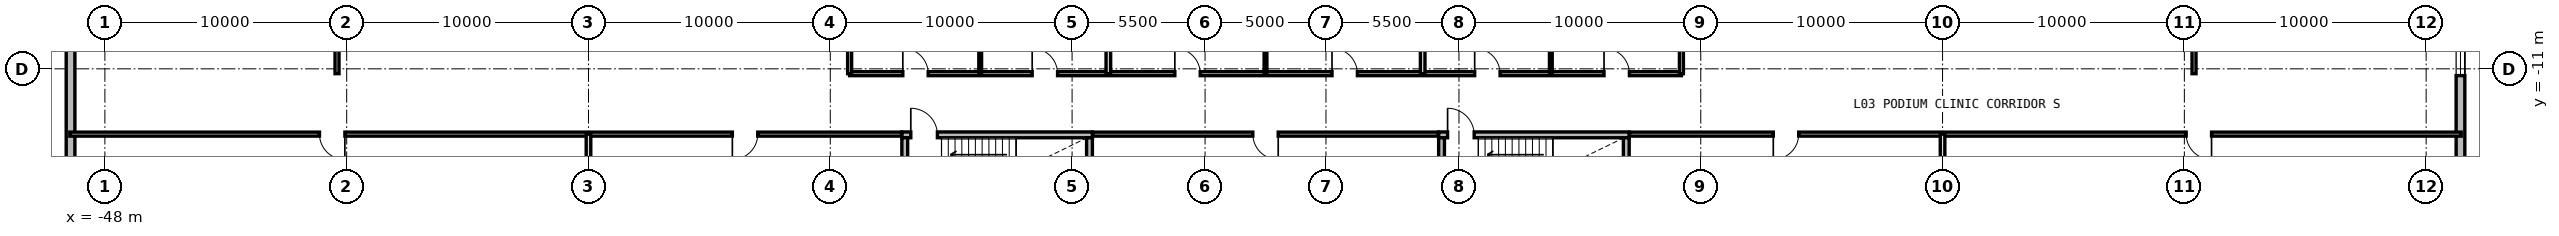
"""IFC4 building model, lengths in metres.
Left out: names, types, materials, properties, quantities, classifications, styles, units other than length and angle.
Written with IfcOpenShell. Run it as: python <this file> out.ifc"""

import sys

from ifc_helpers import new_model, si_unit, direction, frame, frame_2d, origin, place, context, subcontext, project, spatial, rectangle, extrude, source, transform, mapped, element, fill, save


model = new_model("IFC4")
c1 = context("Model", 3, precision=1e-05, world=origin(), true_north=direction((0.0, 1.0)))
c2 = subcontext(c1, "Body", "Model", "MODEL_VIEW")
j1 = project(units=[si_unit("LENGTHUNIT", "METRE"), si_unit("PLANEANGLEUNIT", "RADIAN")], contexts=[c1])
p1 = place(None, origin())
s1 = spatial("IfcSite", under=j1, at=p1, CompositionType="ELEMENT")
p2 = place(p1, origin())
s2 = spatial("IfcBuilding", under=s1, at=p2, CompositionType="ELEMENT")
p3 = place(p2, frame((0.0, 0.0, 12.6)))
s3 = spatial("IfcBuildingStorey", under=s2, at=p3, CompositionType="ELEMENT", Elevation=12.6)
m1 = source(origin(), c2, "Body", "SweptSolid", [
    extrude(rectangle(XDim=40.64, YDim=0.36, at=frame_2d((20.32, 0.0))), origin(), (0.0, 0.0, 1.0), 3.88),
])
p4 = place(p3, frame((-49.42, -20.32, 0.0), z_axis=(0.0, 0.0, 1.0), x_axis=(0.0, 1.0, 0.0)))
e1 = element("IfcWall", 1, at=p4, inside=s3, PredefinedType="SOLIDWALL", context=c2, shape_type="MappedRepresentation", body=[
    mapped(m1, transform((0.0, 0.0, 0.0), x_axis=(1.0, 0.0, 0.0), y_axis=(0.0, 1.0, 0.0), z_axis=(0.0, 0.0, 1.0), scale=1.0)),
])
p5 = place(p4, frame((12.4, 0.0, 0.85)))
e2 = element("IfcOpeningElement", 2, at=p5, cuts=e1, PredefinedType="OPENING", context=c2, shape_type="SweptSolid", body=[
    extrude(rectangle(XDim=3.0, YDim=2.1, at=frame_2d((1.5, 1.05))), frame((0.0, 0.19, 0.0), z_axis=(0.0, -1.0, 0.0), x_axis=(1.0, 0.0, 0.0)), (0.0, 0.0, 1.0), 0.38),
])
p6 = place(p3, frame((49.42, 20.32, 0.0), z_axis=(0.0, 0.0, 1.0), x_axis=(0.0, -1.0, 0.0)))
e3 = element("IfcWall", 3, at=p6, inside=s3, PredefinedType="SOLIDWALL", context=c2, shape_type="MappedRepresentation", body=[
    mapped(m1, transform((0.0, 0.0, 0.0), x_axis=(1.0, 0.0, 0.0), y_axis=(0.0, 1.0, 0.0), z_axis=(0.0, 0.0, 1.0), scale=1.0)),
])
p7 = place(p6, frame((4.0, 0.0, 0.85)))
e4 = element("IfcOpeningElement", 4, at=p7, cuts=e3, PredefinedType="OPENING", context=c2, shape_type="SweptSolid", body=[
    extrude(rectangle(XDim=2.4, YDim=2.2, at=frame_2d((1.2, 1.1))), frame((0.0, 0.19, 0.0), z_axis=(0.0, -1.0, 0.0), x_axis=(1.0, 0.0, 0.0)), (0.0, 0.0, 1.0), 0.38),
])
p8 = place(p6, frame((12.4, 0.0, 0.85)))
e5 = element("IfcOpeningElement", 5, at=p8, cuts=e3, PredefinedType="OPENING", context=c2, shape_type="SweptSolid", body=[
    extrude(rectangle(XDim=3.0, YDim=2.1, at=frame_2d((1.5, 1.05))), frame((0.0, 0.19, 0.0), z_axis=(0.0, -1.0, 0.0), x_axis=(1.0, 0.0, 0.0)), (0.0, 0.0, 1.0), 0.38),
])
p9 = place(p6, frame((29.2, 0.0, 0.85)))
e6 = element("IfcOpeningElement", 6, at=p9, cuts=e3, PredefinedType="OPENING", context=c2, shape_type="SweptSolid", body=[
    extrude(rectangle(XDim=2.4, YDim=2.2, at=frame_2d((1.2, 1.1))), frame((0.0, 0.19, 0.0), z_axis=(0.0, -1.0, 0.0), x_axis=(1.0, 0.0, 0.0)), (0.0, 0.0, 1.0), 0.38),
])
m2 = source(origin(), c2, "Body", "SweptSolid", [
    extrude(rectangle(XDim=7.88, YDim=0.24, at=frame_2d((3.94, 0.0))), origin(), (0.0, 0.0, 1.0), 3.88),
])
p10 = place(p3, frame((-15.04, -13.73, 0.0), z_axis=(0.0, 0.0, 1.0), x_axis=(1.0, 0.0, 0.0)))
e7 = element("IfcWall", 7, at=p10, inside=s3, PredefinedType="PARTITIONING", context=c2, shape_type="MappedRepresentation", body=[
    mapped(m2, transform((0.0, 0.0, 0.0), x_axis=(1.0, 0.0, 0.0), y_axis=(0.0, 1.0, 0.0), z_axis=(0.0, 0.0, 1.0), scale=1.0)),
])
p11 = place(p10, frame((0.37, 0.0, 0.0)))
e8 = element("IfcOpeningElement", 8, at=p11, cuts=e7, PredefinedType="OPENING", context=c2, shape_type="SweptSolid", body=[
    extrude(rectangle(XDim=1.1, YDim=2.15, at=frame_2d((0.55, 1.075))), frame((0.0, 0.13, 0.0), z_axis=(0.0, -1.0, 0.0), x_axis=(1.0, 0.0, 0.0)), (0.0, 0.0, 1.0), 0.26),
])
m3 = source(origin(), c2, "Body", "SweptSolid", [
    extrude(rectangle(XDim=2.95, YDim=0.24, at=frame_2d((1.475, 0.0))), origin(), (0.0, 0.0, 1.0), 3.88),
])
for number, where, z_axis, x_axis in (
    (9, (-14.92, -16.8, 0.0), (0.0, 0.0, 1.0), (0.0, 1.0, 0.0)),
    (10, (-7.28, -16.8, 0.0), (0.0, 0.0, 1.0), (0.0, 1.0, 0.0)),
):
    element("IfcWall", number, at=place(p3, frame(where, z_axis=z_axis, x_axis=x_axis)), inside=s3, PredefinedType="PARTITIONING", context=c2, shape_type="MappedRepresentation", body=[
        mapped(m3, transform((0.0, 0.0, 0.0), x_axis=(1.0, 0.0, 0.0), y_axis=(0.0, 1.0, 0.0), z_axis=(0.0, 0.0, 1.0), scale=1.0)),
    ])
p12 = place(p3, frame((7.16, -13.73, 0.0), z_axis=(0.0, 0.0, 1.0), x_axis=(1.0, 0.0, 0.0)))
e11 = element("IfcWall", 11, at=p12, inside=s3, PredefinedType="PARTITIONING", context=c2, shape_type="MappedRepresentation", body=[
    mapped(m2, transform((0.0, 0.0, 0.0), x_axis=(1.0, 0.0, 0.0), y_axis=(0.0, 1.0, 0.0), z_axis=(0.0, 0.0, 1.0), scale=1.0)),
])
p13 = place(p12, frame((0.37, 0.0, 0.0)))
e12 = element("IfcOpeningElement", 12, at=p13, cuts=e11, PredefinedType="OPENING", context=c2, shape_type="SweptSolid", body=[
    extrude(rectangle(XDim=1.1, YDim=2.15, at=frame_2d((0.55, 1.075))), frame((0.0, 0.13, 0.0), z_axis=(0.0, -1.0, 0.0), x_axis=(1.0, 0.0, 0.0)), (0.0, 0.0, 1.0), 0.26),
])
for number, where, z_axis, x_axis in (
    (13, (7.28, -16.8, 0.0), (0.0, 0.0, 1.0), (0.0, 1.0, 0.0)),
    (14, (14.92, -16.8, 0.0), (0.0, 0.0, 1.0), (0.0, 1.0, 0.0)),
):
    element("IfcWall", number, at=place(p3, frame(where, z_axis=z_axis, x_axis=x_axis)), inside=s3, PredefinedType="PARTITIONING", context=c2, shape_type="MappedRepresentation", body=[
        mapped(m3, transform((0.0, 0.0, 0.0), x_axis=(1.0, 0.0, 0.0), y_axis=(0.0, 1.0, 0.0), z_axis=(0.0, 0.0, 1.0), scale=1.0)),
    ])
m4 = source(origin(), c2, "Body", "SweptSolid", [
    extrude(rectangle(XDim=17.6, YDim=0.165, at=frame_2d((8.8, 0.0))), origin(), (0.0, 0.0, 1.0), 3.865),
])
p14 = place(p3, frame((-38.4, -11.2, 0.0), z_axis=(0.0, 0.0, 1.0), x_axis=(0.0, 1.0, 0.0)))
e15 = element("IfcWall", 15, at=p14, inside=s3, PredefinedType="PARTITIONING", context=c2, shape_type="MappedRepresentation", body=[
    mapped(m4, transform((0.0, 0.0, 0.0), x_axis=(1.0, 0.0, 0.0), y_axis=(0.0, 1.0, 0.0), z_axis=(0.0, 0.0, 1.0), scale=1.0)),
])
p15 = place(p14, frame((4.2, 0.0, 0.0)))
e16 = element("IfcOpeningElement", 16, at=p15, cuts=e15, PredefinedType="OPENING", context=c2, shape_type="SweptSolid", body=[
    extrude(rectangle(XDim=1.25, YDim=2.2, at=frame_2d((0.625, 1.1))), frame((0.0, 0.093, 0.0), z_axis=(0.0, -1.0, 0.0), x_axis=(1.0, 0.0, 0.0)), (0.0, 0.0, 1.0), 0.185),
])
p16 = place(p14, frame((13.5, 0.0, 0.0)))
e17 = element("IfcOpeningElement", 17, at=p16, cuts=e15, PredefinedType="OPENING", context=c2, shape_type="SweptSolid", body=[
    extrude(rectangle(XDim=1.25, YDim=2.2, at=frame_2d((0.625, 1.1))), frame((0.0, 0.093, 0.0), z_axis=(0.0, -1.0, 0.0), x_axis=(1.0, 0.0, 0.0)), (0.0, 0.0, 1.0), 0.185),
])
p17 = place(p3, frame((38.4, -11.2, 0.0), z_axis=(0.0, 0.0, 1.0), x_axis=(0.0, 1.0, 0.0)))
e18 = element("IfcWall", 18, at=p17, inside=s3, PredefinedType="PARTITIONING", context=c2, shape_type="MappedRepresentation", body=[
    mapped(m4, transform((0.0, 0.0, 0.0), x_axis=(1.0, 0.0, 0.0), y_axis=(0.0, 1.0, 0.0), z_axis=(0.0, 0.0, 1.0), scale=1.0)),
])
p18 = place(p17, frame((4.2, 0.0, 0.0)))
e19 = element("IfcOpeningElement", 19, at=p18, cuts=e18, PredefinedType="OPENING", context=c2, shape_type="SweptSolid", body=[
    extrude(rectangle(XDim=1.25, YDim=2.2, at=frame_2d((0.625, 1.1))), frame((0.0, 0.093, 0.0), z_axis=(0.0, -1.0, 0.0), x_axis=(1.0, 0.0, 0.0)), (0.0, 0.0, 1.0), 0.185),
])
p19 = place(p17, frame((13.5, 0.0, 0.0)))
e20 = element("IfcOpeningElement", 20, at=p19, cuts=e18, PredefinedType="OPENING", context=c2, shape_type="SweptSolid", body=[
    extrude(rectangle(XDim=1.25, YDim=2.2, at=frame_2d((0.625, 1.1))), frame((0.0, 0.093, 0.0), z_axis=(0.0, -1.0, 0.0), x_axis=(1.0, 0.0, 0.0)), (0.0, 0.0, 1.0), 0.185),
])
m5 = source(origin(), c2, "Body", "SweptSolid", [
    extrude(rectangle(XDim=34.4, YDim=0.165, at=frame_2d((17.2, 0.0))), origin(), (0.0, 0.0, 1.0), 3.865),
])
p20 = place(p3, frame((-17.2, -11.2, 0.0), z_axis=(0.0, 0.0, 1.0), x_axis=(1.0, 0.0, 0.0)))
e21 = element("IfcWall", 21, at=p20, inside=s3, PredefinedType="PARTITIONING", context=c2, shape_type="MappedRepresentation", body=[
    mapped(m5, transform((0.0, 0.0, 0.0), x_axis=(1.0, 0.0, 0.0), y_axis=(0.0, 1.0, 0.0), z_axis=(0.0, 0.0, 1.0), scale=1.0)),
])
p21 = place(p20, frame((2.2, 0.0, 0.0)))
e22 = element("IfcOpeningElement", 22, at=p21, cuts=e21, PredefinedType="OPENING", context=c2, shape_type="SweptSolid", body=[
    extrude(rectangle(XDim=1.05, YDim=2.15, at=frame_2d((0.525, 1.075))), frame((0.0, 0.093, 0.0), z_axis=(0.0, -1.0, 0.0), x_axis=(1.0, 0.0, 0.0)), (0.0, 0.0, 1.0), 0.185),
])
p22 = place(p20, frame((7.55, 0.0, 0.0)))
e23 = element("IfcOpeningElement", 23, at=p22, cuts=e21, PredefinedType="OPENING", context=c2, shape_type="SweptSolid", body=[
    extrude(rectangle(XDim=1.05, YDim=2.15, at=frame_2d((0.525, 1.075))), frame((0.0, 0.093, 0.0), z_axis=(0.0, -1.0, 0.0), x_axis=(1.0, 0.0, 0.0)), (0.0, 0.0, 1.0), 0.185),
])
p23 = place(p20, frame((13.45, 0.0, 0.0)))
e24 = element("IfcOpeningElement", 24, at=p23, cuts=e21, PredefinedType="OPENING", context=c2, shape_type="SweptSolid", body=[
    extrude(rectangle(XDim=1.05, YDim=2.15, at=frame_2d((0.525, 1.075))), frame((0.0, 0.093, 0.0), z_axis=(0.0, -1.0, 0.0), x_axis=(1.0, 0.0, 0.0)), (0.0, 0.0, 1.0), 0.185),
])
p24 = place(p20, frame((19.95, 0.0, 0.0)))
e25 = element("IfcOpeningElement", 25, at=p24, cuts=e21, PredefinedType="OPENING", context=c2, shape_type="SweptSolid", body=[
    extrude(rectangle(XDim=1.05, YDim=2.15, at=frame_2d((0.525, 1.075))), frame((0.0, 0.093, 0.0), z_axis=(0.0, -1.0, 0.0), x_axis=(1.0, 0.0, 0.0)), (0.0, 0.0, 1.0), 0.185),
])
p25 = place(p20, frame((25.85, 0.0, 0.0)))
e26 = element("IfcOpeningElement", 26, at=p25, cuts=e21, PredefinedType="OPENING", context=c2, shape_type="SweptSolid", body=[
    extrude(rectangle(XDim=1.05, YDim=2.15, at=frame_2d((0.525, 1.075))), frame((0.0, 0.093, 0.0), z_axis=(0.0, -1.0, 0.0), x_axis=(1.0, 0.0, 0.0)), (0.0, 0.0, 1.0), 0.185),
])
p26 = place(p20, frame((31.2, 0.0, 0.0)))
e27 = element("IfcOpeningElement", 27, at=p26, cuts=e21, PredefinedType="OPENING", context=c2, shape_type="SweptSolid", body=[
    extrude(rectangle(XDim=1.05, YDim=2.15, at=frame_2d((0.525, 1.075))), frame((0.0, 0.093, 0.0), z_axis=(0.0, -1.0, 0.0), x_axis=(1.0, 0.0, 0.0)), (0.0, 0.0, 1.0), 0.185),
])
for number, where, z_axis, x_axis in (
    (28, (-17.2, -11.2, 0.0), (0.0, 0.0, 1.0), (0.0, 1.0, 0.0)),
    (29, (17.2, -11.2, 0.0), (0.0, 0.0, 1.0), (0.0, 1.0, 0.0)),
):
    element("IfcWall", number, at=place(p3, frame(where, z_axis=z_axis, x_axis=x_axis)), inside=s3, PredefinedType="PARTITIONING", context=c2, shape_type="MappedRepresentation", body=[
        mapped(m4, transform((0.0, 0.0, 0.0), x_axis=(1.0, 0.0, 0.0), y_axis=(0.0, 1.0, 0.0), z_axis=(0.0, 0.0, 1.0), scale=1.0)),
    ])
m6 = source(origin(), c2, "Body", "SweptSolid", [
    extrude(rectangle(XDim=17.6, YDim=0.19, at=frame_2d((8.8, 0.0))), origin(), (0.0, 0.0, 1.0), 3.215),
])
for number, where, z_axis, x_axis in (
    (30, (-6.5, -11.2, 0.0), (0.0, 0.0, 1.0), (0.0, 1.0, 0.0)),
    (31, (6.5, -11.2, 0.0), (0.0, 0.0, 1.0), (0.0, 1.0, 0.0)),
):
    element("IfcWall", number, at=place(p3, frame(where, z_axis=z_axis, x_axis=x_axis)), inside=s3, PredefinedType="PARTITIONING", context=c2, shape_type="MappedRepresentation", body=[
        mapped(m6, transform((0.0, 0.0, 0.0), x_axis=(1.0, 0.0, 0.0), y_axis=(0.0, 1.0, 0.0), z_axis=(0.0, 0.0, 1.0), scale=1.0)),
    ])
m7 = source(origin(), c2, "Body", "SweptSolid", [
    extrude(rectangle(XDim=17.6, YDim=0.115, at=frame_2d((8.8, 0.0))), origin(), (0.0, 0.0, 1.0), 3.865),
])
for number, where, z_axis, x_axis in (
    (32, (-11.8, -11.2, 0.0), (0.0, 0.0, 1.0), (0.0, 1.0, 0.0)),
    (33, (0.0, -11.2, 0.0), (0.0, 0.0, 1.0), (0.0, 1.0, 0.0)),
    (34, (11.8, -11.2, 0.0), (0.0, 0.0, 1.0), (0.0, 1.0, 0.0)),
):
    element("IfcWall", number, at=place(p3, frame(where, z_axis=z_axis, x_axis=x_axis)), inside=s3, PredefinedType="PARTITIONING", context=c2, shape_type="MappedRepresentation", body=[
        mapped(m7, transform((0.0, 0.0, 0.0), x_axis=(1.0, 0.0, 0.0), y_axis=(0.0, 1.0, 0.0), z_axis=(0.0, 0.0, 1.0), scale=1.0)),
    ])
p27 = place(p3, frame((-49.45, -13.7, 0.0), z_axis=(0.0, 0.0, 1.0), x_axis=(1.0, 0.0, 0.0)))
e35 = element("IfcWall", 35, at=p27, inside=s3, PredefinedType="PARTITIONING", context=c2, shape_type="MappedRepresentation", body=[
    mapped(m5, transform((0.0, 0.0, 0.0), x_axis=(1.0, 0.0, 0.0), y_axis=(0.0, 1.0, 0.0), z_axis=(0.0, 0.0, 1.0), scale=1.0)),
])
p28 = place(p27, frame((10.325, 0.0, 0.0)))
e36 = element("IfcOpeningElement", 36, at=p28, cuts=e35, PredefinedType="OPENING", context=c2, shape_type="SweptSolid", body=[
    extrude(rectangle(XDim=1.05, YDim=2.15, at=frame_2d((0.525, 1.075))), frame((0.0, 0.093, 0.0), z_axis=(0.0, -1.0, 0.0), x_axis=(1.0, 0.0, 0.0)), (0.0, 0.0, 1.0), 0.185),
])
p29 = place(p27, frame((27.4, 0.0, 0.0)))
e37 = element("IfcOpeningElement", 37, at=p29, cuts=e35, PredefinedType="OPENING", context=c2, shape_type="SweptSolid", body=[
    extrude(rectangle(XDim=1.05, YDim=2.15, at=frame_2d((0.525, 1.075))), frame((0.0, 0.093, 0.0), z_axis=(0.0, -1.0, 0.0), x_axis=(1.0, 0.0, 0.0)), (0.0, 0.0, 1.0), 0.185),
])
m8 = source(origin(), c2, "Body", "SweptSolid", [
    extrude(rectangle(XDim=14.3, YDim=0.165, at=frame_2d((7.15, 0.0))), origin(), (0.0, 0.0, 1.0), 3.865),
])
p30 = place(p3, frame((-7.15, -13.7, 0.0), z_axis=(0.0, 0.0, 1.0), x_axis=(1.0, 0.0, 0.0)))
e38 = element("IfcWall", 38, at=p30, inside=s3, PredefinedType="PARTITIONING", context=c2, shape_type="MappedRepresentation", body=[
    mapped(m8, transform((0.0, 0.0, 0.0), x_axis=(1.0, 0.0, 0.0), y_axis=(0.0, 1.0, 0.0), z_axis=(0.0, 0.0, 1.0), scale=1.0)),
])
p31 = place(p30, frame((6.625, 0.0, 0.0)))
e39 = element("IfcOpeningElement", 39, at=p31, cuts=e38, PredefinedType="OPENING", context=c2, shape_type="SweptSolid", body=[
    extrude(rectangle(XDim=1.05, YDim=2.15, at=frame_2d((0.525, 1.075))), frame((0.0, 0.093, 0.0), z_axis=(0.0, -1.0, 0.0), x_axis=(1.0, 0.0, 0.0)), (0.0, 0.0, 1.0), 0.185),
])
p32 = place(p3, frame((15.05, -13.7, 0.0), z_axis=(0.0, 0.0, 1.0), x_axis=(1.0, 0.0, 0.0)))
e40 = element("IfcWall", 40, at=p32, inside=s3, PredefinedType="PARTITIONING", context=c2, shape_type="MappedRepresentation", body=[
    mapped(m5, transform((0.0, 0.0, 0.0), x_axis=(1.0, 0.0, 0.0), y_axis=(0.0, 1.0, 0.0), z_axis=(0.0, 0.0, 1.0), scale=1.0)),
])
p33 = place(p32, frame((5.95, 0.0, 0.0)))
e41 = element("IfcOpeningElement", 41, at=p33, cuts=e40, PredefinedType="OPENING", context=c2, shape_type="SweptSolid", body=[
    extrude(rectangle(XDim=1.05, YDim=2.15, at=frame_2d((0.525, 1.075))), frame((0.0, 0.093, 0.0), z_axis=(0.0, -1.0, 0.0), x_axis=(1.0, 0.0, 0.0)), (0.0, 0.0, 1.0), 0.185),
])
p34 = place(p32, frame((23.025, 0.0, 0.0)))
e42 = element("IfcOpeningElement", 42, at=p34, cuts=e40, PredefinedType="OPENING", context=c2, shape_type="SweptSolid", body=[
    extrude(rectangle(XDim=1.05, YDim=2.15, at=frame_2d((0.525, 1.075))), frame((0.0, 0.093, 0.0), z_axis=(0.0, -1.0, 0.0), x_axis=(1.0, 0.0, 0.0)), (0.0, 0.0, 1.0), 0.185),
])
m9 = source(origin(), c2, "Body", "SweptSolid", [
    extrude(rectangle(XDim=6.7, YDim=0.19, at=frame_2d((3.35, 0.0))), origin(), (0.0, 0.0, 1.0), 3.865),
])
for number, where, z_axis, x_axis in (
    (43, (-28.0, -20.4, 0.0), (0.0, 0.0, 1.0), (0.0, 1.0, 0.0)),
    (44, (28.0, -20.4, 0.0), (0.0, 0.0, 1.0), (0.0, 1.0, 0.0)),
):
    element("IfcWall", number, at=place(p3, frame(where, z_axis=z_axis, x_axis=x_axis)), inside=s3, PredefinedType="PARTITIONING", context=c2, shape_type="MappedRepresentation", body=[
        mapped(m9, transform((0.0, 0.0, 0.0), x_axis=(1.0, 0.0, 0.0), y_axis=(0.0, 1.0, 0.0), z_axis=(0.0, 0.0, 1.0), scale=1.0)),
    ])
m10 = source(origin(), c2, "Body", "SweptSolid", [
    extrude(rectangle(XDim=2.4, YDim=2.2, at=frame_2d((1.2, 1.1))), frame((0.0, 0.03, 0.0), z_axis=(0.0, -1.0, 0.0), x_axis=(1.0, 0.0, 0.0)), (0.0, 0.0, 1.0), 0.06),
])
p35 = place(p9, origin())
e45 = element("IfcWindow", 45, at=p35, inside=s3, PartitioningType="SINGLE_PANEL", PredefinedType="WINDOW", context=c2, shape_type="MappedRepresentation", body=[
    mapped(m10, transform((0.0, 0.0, 0.0), x_axis=(1.0, 0.0, 0.0), y_axis=(0.0, 1.0, 0.0), z_axis=(0.0, 0.0, 1.0), scale=1.0)),
])
fill(e6, e45)
m11 = source(origin(), c2, "Body", "SweptSolid", [
    extrude(rectangle(XDim=1.1, YDim=2.15, at=frame_2d((0.55, 1.075))), frame((0.0, 0.025, 0.0), z_axis=(0.0, -1.0, 0.0), x_axis=(1.0, 0.0, 0.0)), (0.0, 0.0, 1.0), 0.05),
])
p36 = place(p11, origin())
e46 = element("IfcDoor", 46, at=p36, inside=s3, OperationType="SINGLE_SWING_LEFT", PredefinedType="DOOR", context=c2, shape_type="MappedRepresentation", body=[
    mapped(m11, transform((0.0, 0.0, 0.0), x_axis=(1.0, 0.0, 0.0), y_axis=(0.0, 1.0, 0.0), z_axis=(0.0, 0.0, 1.0), scale=1.0)),
])
fill(e8, e46)
p37 = place(p13, origin())
e47 = element("IfcDoor", 47, at=p37, inside=s3, OperationType="SINGLE_SWING_LEFT", PredefinedType="DOOR", context=c2, shape_type="MappedRepresentation", body=[
    mapped(m11, transform((0.0, 0.0, 0.0), x_axis=(1.0, 0.0, 0.0), y_axis=(0.0, 1.0, 0.0), z_axis=(0.0, 0.0, 1.0), scale=1.0)),
])
fill(e12, e47)
m12 = source(origin(), c2, "Body", "SweptSolid", [
    extrude(rectangle(XDim=1.05, YDim=2.15, at=frame_2d((0.525, 1.075))), frame((0.0, 0.025, 0.0), z_axis=(0.0, -1.0, 0.0), x_axis=(1.0, 0.0, 0.0)), (0.0, 0.0, 1.0), 0.05),
])
p38 = place(p21, origin())
e48 = element("IfcDoor", 48, at=p38, inside=s3, OperationType="SINGLE_SWING_LEFT", PredefinedType="DOOR", context=c2, shape_type="MappedRepresentation", body=[
    mapped(m12, transform((0.0, 0.0, 0.0), x_axis=(1.0, 0.0, 0.0), y_axis=(0.0, 1.0, 0.0), z_axis=(0.0, 0.0, 1.0), scale=1.0)),
])
fill(e22, e48)
p39 = place(p22, origin())
e49 = element("IfcDoor", 49, at=p39, inside=s3, OperationType="SINGLE_SWING_LEFT", PredefinedType="DOOR", context=c2, shape_type="MappedRepresentation", body=[
    mapped(m12, transform((0.0, 0.0, 0.0), x_axis=(1.0, 0.0, 0.0), y_axis=(0.0, 1.0, 0.0), z_axis=(0.0, 0.0, 1.0), scale=1.0)),
])
fill(e23, e49)
p40 = place(p23, origin())
e50 = element("IfcDoor", 50, at=p40, inside=s3, OperationType="SINGLE_SWING_LEFT", PredefinedType="DOOR", context=c2, shape_type="MappedRepresentation", body=[
    mapped(m12, transform((0.0, 0.0, 0.0), x_axis=(1.0, 0.0, 0.0), y_axis=(0.0, 1.0, 0.0), z_axis=(0.0, 0.0, 1.0), scale=1.0)),
])
fill(e24, e50)
p41 = place(p24, origin())
e51 = element("IfcDoor", 51, at=p41, inside=s3, OperationType="SINGLE_SWING_LEFT", PredefinedType="DOOR", context=c2, shape_type="MappedRepresentation", body=[
    mapped(m12, transform((0.0, 0.0, 0.0), x_axis=(1.0, 0.0, 0.0), y_axis=(0.0, 1.0, 0.0), z_axis=(0.0, 0.0, 1.0), scale=1.0)),
])
fill(e25, e51)
p42 = place(p25, origin())
e52 = element("IfcDoor", 52, at=p42, inside=s3, OperationType="SINGLE_SWING_LEFT", PredefinedType="DOOR", context=c2, shape_type="MappedRepresentation", body=[
    mapped(m12, transform((0.0, 0.0, 0.0), x_axis=(1.0, 0.0, 0.0), y_axis=(0.0, 1.0, 0.0), z_axis=(0.0, 0.0, 1.0), scale=1.0)),
])
fill(e26, e52)
p43 = place(p26, origin())
e53 = element("IfcDoor", 53, at=p43, inside=s3, OperationType="SINGLE_SWING_LEFT", PredefinedType="DOOR", context=c2, shape_type="MappedRepresentation", body=[
    mapped(m12, transform((0.0, 0.0, 0.0), x_axis=(1.0, 0.0, 0.0), y_axis=(0.0, 1.0, 0.0), z_axis=(0.0, 0.0, 1.0), scale=1.0)),
])
fill(e27, e53)
p44 = place(p28, frame((1.05, 0.0, 0.0), z_axis=(0.0, 0.0, 1.0), x_axis=(-1.0, 0.0, 0.0)))
e54 = element("IfcDoor", 54, at=p44, inside=s3, OperationType="SINGLE_SWING_LEFT", PredefinedType="DOOR", context=c2, shape_type="MappedRepresentation", body=[
    mapped(m12, transform((0.0, 0.0, 0.0), x_axis=(1.0, 0.0, 0.0), y_axis=(0.0, 1.0, 0.0), z_axis=(0.0, 0.0, 1.0), scale=1.0)),
])
fill(e36, e54)
p45 = place(p29, frame((1.05, 0.0, 0.0), z_axis=(0.0, 0.0, 1.0), x_axis=(-1.0, 0.0, 0.0)))
e55 = element("IfcDoor", 55, at=p45, inside=s3, OperationType="SINGLE_SWING_RIGHT", PredefinedType="DOOR", context=c2, shape_type="MappedRepresentation", body=[
    mapped(m12, transform((0.0, 0.0, 0.0), x_axis=(1.0, 0.0, 0.0), y_axis=(0.0, 1.0, 0.0), z_axis=(0.0, 0.0, 1.0), scale=1.0)),
])
fill(e37, e55)
p46 = place(p31, frame((1.05, 0.0, 0.0), z_axis=(0.0, 0.0, 1.0), x_axis=(-1.0, 0.0, 0.0)))
e56 = element("IfcDoor", 56, at=p46, inside=s3, OperationType="SINGLE_SWING_LEFT", PredefinedType="DOOR", context=c2, shape_type="MappedRepresentation", body=[
    mapped(m12, transform((0.0, 0.0, 0.0), x_axis=(1.0, 0.0, 0.0), y_axis=(0.0, 1.0, 0.0), z_axis=(0.0, 0.0, 1.0), scale=1.0)),
])
fill(e39, e56)
p47 = place(p33, frame((1.05, 0.0, 0.0), z_axis=(0.0, 0.0, 1.0), x_axis=(-1.0, 0.0, 0.0)))
e57 = element("IfcDoor", 57, at=p47, inside=s3, OperationType="SINGLE_SWING_RIGHT", PredefinedType="DOOR", context=c2, shape_type="MappedRepresentation", body=[
    mapped(m12, transform((0.0, 0.0, 0.0), x_axis=(1.0, 0.0, 0.0), y_axis=(0.0, 1.0, 0.0), z_axis=(0.0, 0.0, 1.0), scale=1.0)),
])
fill(e41, e57)
p48 = place(p34, frame((1.05, 0.0, 0.0), z_axis=(0.0, 0.0, 1.0), x_axis=(-1.0, 0.0, 0.0)))
e58 = element("IfcDoor", 58, at=p48, inside=s3, OperationType="SINGLE_SWING_LEFT", PredefinedType="DOOR", context=c2, shape_type="MappedRepresentation", body=[
    mapped(m12, transform((0.0, 0.0, 0.0), x_axis=(1.0, 0.0, 0.0), y_axis=(0.0, 1.0, 0.0), z_axis=(0.0, 0.0, 1.0), scale=1.0)),
])
fill(e42, e58)
save(model, sys.argv[1])
